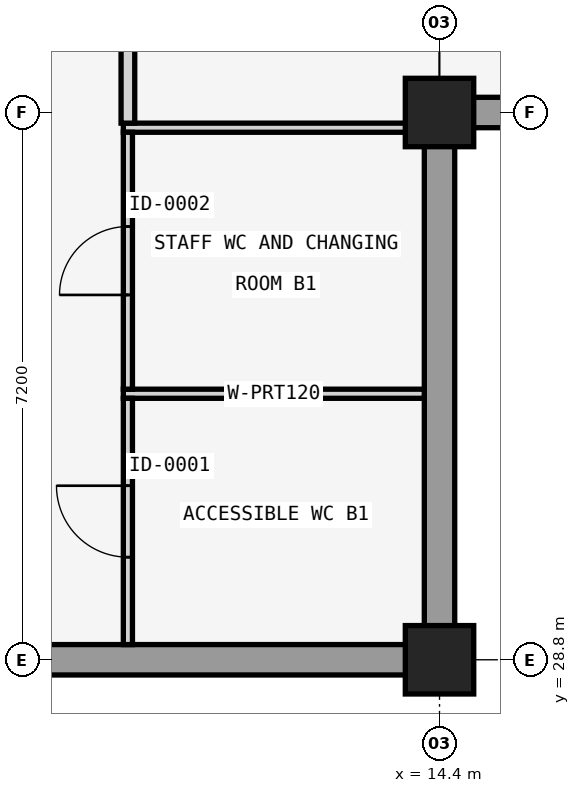
"""IFC4 building model, lengths in metres.
Left out: names, types, materials, properties, quantities, classifications, styles, units other than length and angle.
Written with IfcOpenShell. Run it as: python <this file> out.ifc"""

import sys

from ifc_helpers import new_model, si_unit, direction, frame, frame_2d, origin, origin_2d, place, context, subcontext, project, spatial, rectangle, extrude, element, fill, save


model = new_model("IFC4")
c1 = context("Model", 3, precision=1e-05, world=origin(), true_north=direction((0.0, 1.0)))
c2 = subcontext(c1, "Body", "Model", "MODEL_VIEW")
j1 = project(units=[si_unit("LENGTHUNIT", "METRE"), si_unit("PLANEANGLEUNIT", "RADIAN")], contexts=[c1])
p1 = place(None, origin())
s1 = spatial("IfcSite", under=j1, at=p1, CompositionType="ELEMENT")
p2 = place(p1, origin())
s2 = spatial("IfcBuilding", under=s1, at=p2, CompositionType="ELEMENT")
p3 = place(p2, frame((0.0, 0.0, -4.8)))
s3 = spatial("IfcBuildingStorey", under=s2, at=p3, CompositionType="ELEMENT", Elevation=-4.8)
for number, where, z_axis, x_axis in (
    (1, (14.4, 28.8, 0.0), (0.0, 0.0, 1.0), (1.0, 0.0, 0.0)),
    (2, (14.4, 36.0, 0.0), (0.0, 0.0, 1.0), (1.0, 0.0, 0.0)),
):
    element("IfcColumn", number, at=place(p3, frame(where, z_axis=z_axis, x_axis=x_axis)), inside=s3, PredefinedType="COLUMN", context=c2, shape_type="SweptSolid", body=[
        extrude(rectangle(XDim=0.9, YDim=0.9, at=origin_2d()), origin(), (0.0, 0.0, 1.0), 4.8),
    ])
p4 = place(p3, frame((0.0, 28.8, 0.0), z_axis=(0.0, 0.0, 1.0), x_axis=(1.0, 0.0, 0.0)))
e3 = element("IfcWall", 3, at=p4, inside=s3, PredefinedType="STANDARD", context=c2, shape_type="SweptSolid", body=[
    extrude(rectangle(XDim=14.4, YDim=0.4, at=frame_2d((7.2, 0.0))), origin(), (0.0, 0.0, 1.0), 4.4),
])
p5 = place(p3, frame((14.4, 28.8, 0.0), z_axis=(0.0, 0.0, 1.0), x_axis=(0.0, 1.0, 0.0)))
e4 = element("IfcWall", 4, at=p5, inside=s3, PredefinedType="STANDARD", context=c2, shape_type="SweptSolid", body=[
    extrude(rectangle(XDim=7.2, YDim=0.4, at=frame_2d((3.6, 0.0))), origin(), (0.0, 0.0, 1.0), 4.4),
])
p6 = place(p3, frame((14.4, 36.0, 0.0), z_axis=(0.0, 0.0, 1.0), x_axis=(1.0, 0.0, 0.0)))
e5 = element("IfcWall", 5, at=p6, inside=s3, PredefinedType="STANDARD", context=c2, shape_type="SweptSolid", body=[
    extrude(rectangle(XDim=43.2, YDim=0.4, at=frame_2d((21.6, 0.0))), origin(), (0.0, 0.0, 1.0), 4.4),
])
p7 = place(p3, frame((10.24, 32.3, 0.0), z_axis=(0.0, 0.0, 1.0), x_axis=(1.0, 0.0, 0.0)))
e6 = element("IfcWall", 6, at=p7, inside=s3, PredefinedType="PARTITIONING", context=c2, shape_type="SweptSolid", body=[
    extrude(rectangle(XDim=3.96, YDim=0.12, at=frame_2d((1.98, 0.0))), origin(), (0.0, 0.0, 1.0), 3.8),
])
p8 = place(p3, frame((10.3, 29.0, 0.0), z_axis=(0.0, 0.0, 1.0), x_axis=(0.0, 1.0, 0.0)))
e7 = element("IfcWall", 7, at=p8, inside=s3, PredefinedType="PARTITIONING", context=c2, shape_type="SweptSolid", body=[
    extrude(rectangle(XDim=3.24, YDim=0.12, at=frame_2d((1.62, 0.0))), origin(), (0.0, 0.0, 1.0), 4.01),
])
p9 = place(p8, frame((1.15, 0.0, 0.0)))
e8 = element("IfcOpeningElement", 8, at=p9, cuts=e7, PredefinedType="OPENING", context=c2, shape_type="SweptSolid", body=[
    extrude(rectangle(XDim=0.94, YDim=2.1, at=frame_2d((0.47, 1.05))), frame((0.0, 0.07, 0.0), z_axis=(0.0, -1.0, 0.0), x_axis=(1.0, 0.0, 0.0)), (0.0, 0.0, 1.0), 0.14),
])
p10 = place(p3, frame((10.24, 35.8, 0.0), z_axis=(0.0, 0.0, 1.0), x_axis=(1.0, 0.0, 0.0)))
e9 = element("IfcWall", 9, at=p10, inside=s3, PredefinedType="PARTITIONING", context=c2, shape_type="SweptSolid", body=[
    extrude(rectangle(XDim=3.96, YDim=0.12, at=frame_2d((1.98, 0.0))), origin(), (0.0, 0.0, 1.0), 3.8),
])
p11 = place(p3, frame((10.3, 32.36, 0.0), z_axis=(0.0, 0.0, 1.0), x_axis=(0.0, 1.0, 0.0)))
e10 = element("IfcWall", 10, at=p11, inside=s3, PredefinedType="PARTITIONING", context=c2, shape_type="SweptSolid", body=[
    extrude(rectangle(XDim=3.38, YDim=0.12, at=frame_2d((1.69, 0.0))), origin(), (0.0, 0.0, 1.0), 4.4),
])
p12 = place(p11, frame((1.24, 0.0, 0.0)))
e11 = element("IfcOpeningElement", 11, at=p12, cuts=e10, PredefinedType="OPENING", context=c2, shape_type="SweptSolid", body=[
    extrude(rectangle(XDim=0.9, YDim=2.1, at=frame_2d((0.45, 1.05))), frame((0.0, 0.07, 0.0), z_axis=(0.0, -1.0, 0.0), x_axis=(1.0, 0.0, 0.0)), (0.0, 0.0, 1.0), 0.14),
])
p13 = place(p3, frame((10.3, 35.86, 0.0), z_axis=(0.0, 0.0, 1.0), x_axis=(0.0, 1.0, 0.0)))
e12 = element("IfcWall", 12, at=p13, inside=s3, PredefinedType="PARTITIONING", context=c2, shape_type="SweptSolid", body=[
    extrude(rectangle(XDim=28.65, YDim=0.18, at=frame_2d((14.325, 0.0))), origin(), (0.0, 0.0, 1.0), 3.8),
])
p14 = place(p13, frame((13.525, 0.0, 0.0)))
e13 = element("IfcOpeningElement", 13, at=p14, cuts=e12, PredefinedType="OPENING", context=c2, shape_type="SweptSolid", body=[
    extrude(rectangle(XDim=1.6, YDim=2.25, at=frame_2d((0.8, 1.125))), frame((0.0, 0.1, 0.0), z_axis=(0.0, -1.0, 0.0), x_axis=(1.0, 0.0, 0.0)), (0.0, 0.0, 1.0), 0.2),
])
p15 = place(p9, origin())
e14 = element("IfcDoor", 14, at=p15, inside=s3, OperationType="SINGLE_SWING_RIGHT", PredefinedType="DOOR", context=c2, shape_type="SweptSolid", body=[
    extrude(rectangle(XDim=0.94, YDim=2.1, at=frame_2d((0.47, 1.05))), frame((0.0, 0.025, 0.0), z_axis=(0.0, -1.0, 0.0), x_axis=(1.0, 0.0, 0.0)), (0.0, 0.0, 1.0), 0.05),
])
fill(e8, e14)
p16 = place(p12, origin())
e15 = element("IfcDoor", 15, at=p16, inside=s3, OperationType="SINGLE_SWING_LEFT", PredefinedType="DOOR", context=c2, shape_type="SweptSolid", body=[
    extrude(rectangle(XDim=0.9, YDim=2.1, at=frame_2d((0.45, 1.05))), frame((0.0, 0.025, 0.0), z_axis=(0.0, -1.0, 0.0), x_axis=(1.0, 0.0, 0.0)), (0.0, 0.0, 1.0), 0.05),
])
fill(e11, e15)
save(model, sys.argv[1])
